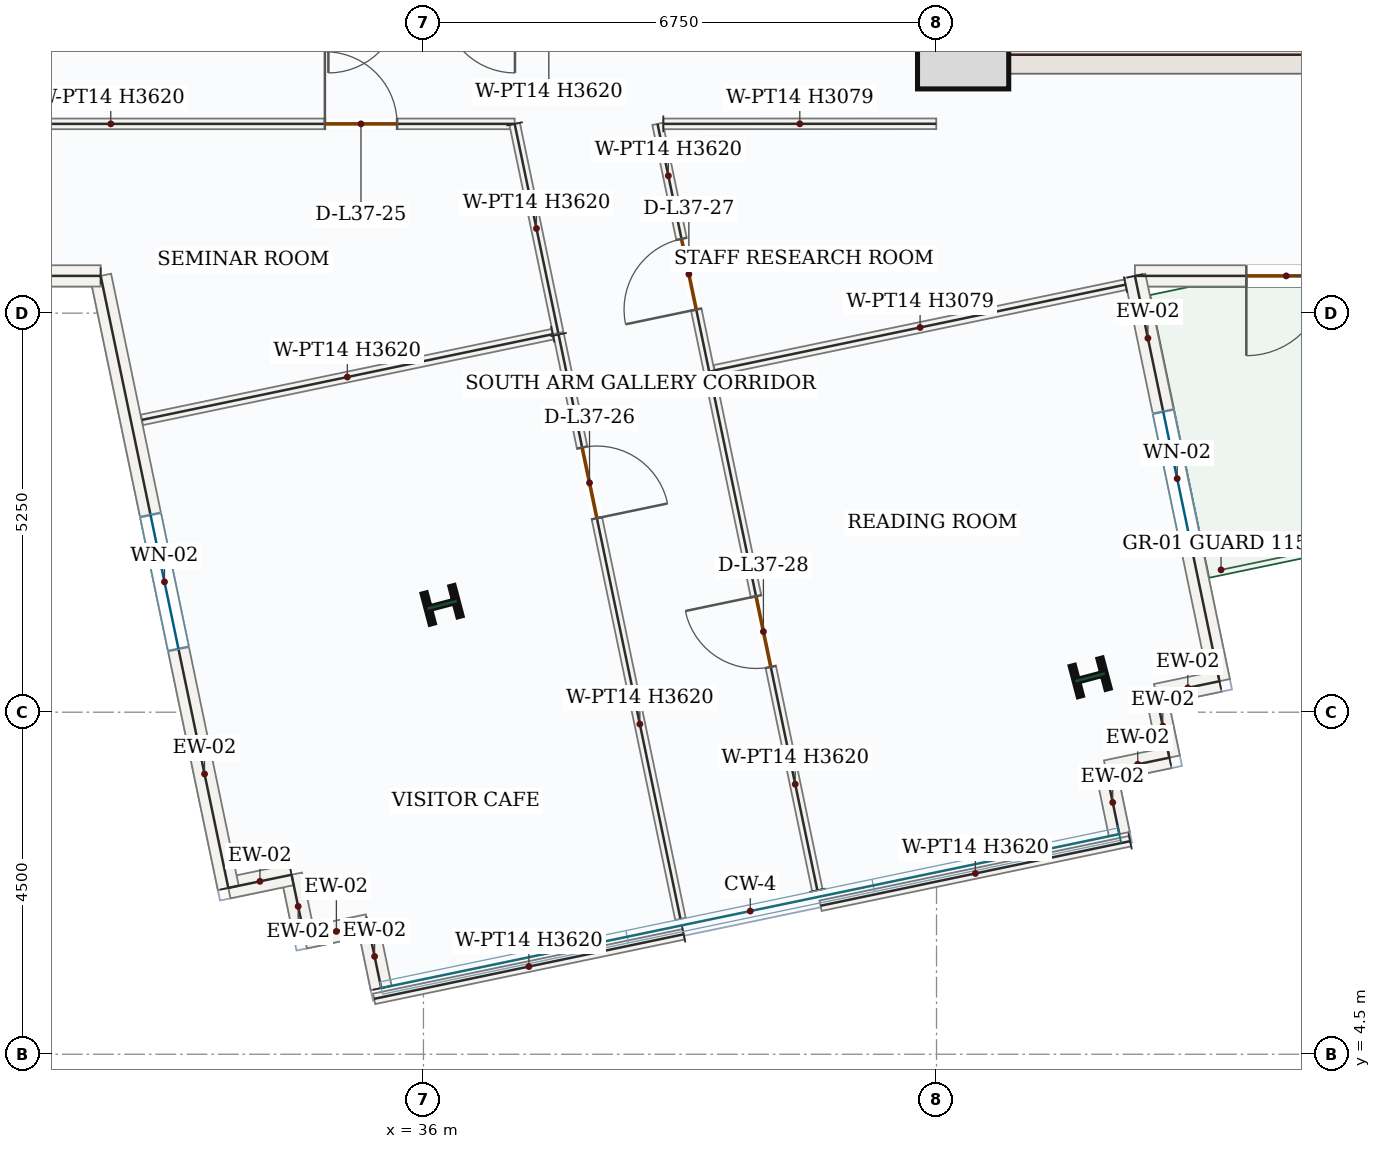
"""IFC4 building model, lengths in metres.
Left out: names, types, materials, properties, quantities, classifications, styles, units other than length and angle.
Written with IfcOpenShell. Run it as: python <this file> out.ifc"""

import sys

from ifc_helpers import new_model, si_unit, direction, frame, frame_2d, origin, origin_2d, place, context, subcontext, project, spatial, rectangle, i_section, extrude, source, transform, mapped, element, fill, save


model = new_model("IFC4")
c1 = context("Model", 3, precision=1e-05, world=origin(), true_north=direction((0.0, 1.0)))
c2 = subcontext(c1, "Body", "Model", "MODEL_VIEW")
j1 = project(units=[si_unit("LENGTHUNIT", "METRE"), si_unit("PLANEANGLEUNIT", "RADIAN")], contexts=[c1])
p1 = place(None, origin())
s1 = spatial("IfcSite", under=j1, at=p1, CompositionType="ELEMENT")
p2 = place(p1, origin())
s2 = spatial("IfcBuilding", under=s1, at=p2, CompositionType="ELEMENT")
p3 = place(p2, frame((0.0, 0.0, 162.9)))
s3 = spatial("IfcBuildingStorey", under=s2, at=p3, CompositionType="ELEMENT", Elevation=162.9)
p4 = place(p3, frame((43.0, 17.4, 0.0), z_axis=(0.0, 0.0, 1.0), x_axis=(0.0, 1.0, 0.0)))
e1 = element("IfcWall", 1, at=p4, inside=s3, PredefinedType="SHEAR", context=c2, shape_type="SweptSolid", body=[
    extrude(rectangle(XDim=8.55, YDim=0.5, at=frame_2d((4.275, 0.0))), origin(), (0.0, 0.0, 1.0), 3.62),
])
p5 = place(p4, frame((6.65, 0.0, 0.0)))
e2 = element("IfcOpeningElement", 2, at=p5, cuts=e1, PredefinedType="OPENING", context=c2, shape_type="SweptSolid", body=[
    extrude(rectangle(XDim=1.1, YDim=2.2, at=frame_2d((0.55, 1.1))), frame((0.0, 0.26, 0.0), z_axis=(0.0, -1.0, 0.0), x_axis=(1.0, 0.0, 0.0)), (0.0, 0.0, 1.0), 0.52),
])
p6 = place(p4, frame((1.75, 0.0, 0.0)))
e3 = element("IfcOpeningElement", 3, at=p6, cuts=e1, PredefinedType="OPENING", context=c2, shape_type="SweptSolid", body=[
    extrude(rectangle(XDim=1.3, YDim=2.2, at=frame_2d((0.65, 1.1))), frame((0.0, 0.26, 0.0), z_axis=(0.0, -1.0, 0.0), x_axis=(1.0, 0.0, 0.0)), (0.0, 0.0, 1.0), 0.52),
])
p7 = place(p4, frame((4.55, 0.0, 0.0)))
e4 = element("IfcOpeningElement", 4, at=p7, cuts=e1, PredefinedType="OPENING", context=c2, shape_type="SweptSolid", body=[
    extrude(rectangle(XDim=0.88, YDim=2.1, at=frame_2d((0.44, 1.05))), frame((0.0, 0.26, 0.0), z_axis=(0.0, -1.0, 0.0), x_axis=(1.0, 0.0, 0.0)), (0.0, 0.0, 1.0), 0.52),
])
m1 = source(origin(), c2, "Body", "SweptSolid", [
    extrude(rectangle(XDim=7.0, YDim=0.5, at=frame_2d((3.5, 0.0))), origin(), (0.0, 0.0, 1.0), 3.62),
])
p8 = place(p3, frame((43.25, 17.65, 0.0), z_axis=(0.0, 0.0, 1.0), x_axis=(1.0, 0.0, 0.0)))
e5 = element("IfcWall", 5, at=p8, inside=s3, PredefinedType="SHEAR", context=c2, shape_type="MappedRepresentation", body=[
    mapped(m1, transform((0.0, 0.0, 0.0), x_axis=(1.0, 0.0, 0.0), y_axis=(0.0, 1.0, 0.0), z_axis=(0.0, 0.0, 1.0), scale=1.0)),
])
m2 = source(origin(), c2, "Body", "SweptSolid", [
    extrude(rectangle(XDim=1.2, YDim=1.2, at=origin_2d()), origin(), (0.0, 0.0, 1.0), 3.9),
])
p9 = place(p3, frame((43.1, 17.8, 0.0), z_axis=(0.0, 0.0, 1.0), x_axis=(1.0, 0.0, 0.0)))
e6 = element("IfcColumn", 6, at=p9, inside=s3, PredefinedType="COLUMN", context=c2, shape_type="MappedRepresentation", body=[
    mapped(m2, transform((0.0, 0.0, 0.0), x_axis=(1.0, 0.0, 0.0), y_axis=(0.0, 1.0, 0.0), z_axis=(0.0, 0.0, 1.0), scale=1.0)),
])
m3 = source(origin(), c2, "Body", "SweptSolid", [
    extrude(i_section(OverallWidth=0.412, OverallDepth=0.435, WebThickness=0.036, FlangeThickness=0.057, FilletRadius=0.018, at=origin_2d()), origin(), (0.0, 0.0, 1.0), 3.9),
])
for number, where, z_axis, x_axis in (
    (7, (36.245, 10.412, 0.0), (0.0, 0.0, 1.0), (-0.255, 0.967, 0.0)),
    (8, (44.772, 9.459, 0.0), (0.0, 0.0, 1.0), (-0.255, 0.967, 0.0)),
):
    element("IfcColumn", number, at=place(p3, frame(where, z_axis=z_axis, x_axis=x_axis)), inside=s3, PredefinedType="COLUMN", context=c2, shape_type="MappedRepresentation", body=[
        mapped(m3, transform((0.0, 0.0, 0.0), x_axis=(1.0, 0.0, 0.0), y_axis=(0.0, 1.0, 0.0), z_axis=(0.0, 0.0, 1.0), scale=1.0)),
    ])
p10 = place(p3, frame((49.342, 14.74, 0.0), z_axis=(0.0, 0.0, 1.0), x_axis=(-1.0, 0.0, 0.0)))
e9 = element("IfcWall", 9, at=p10, inside=s3, PredefinedType="SOLIDWALL", context=c2, shape_type="SweptSolid", body=[
    extrude(rectangle(XDim=3.982, YDim=0.28, at=frame_2d((1.991, 0.0))), origin(), (0.0, 0.0, 1.0), 3.62),
])
p11 = place(p10, frame((1.466, 0.0, 0.0)))
e10 = element("IfcOpeningElement", 10, at=p11, cuts=e9, PredefinedType="OPENING", context=c2, shape_type="SweptSolid", body=[
    extrude(rectangle(XDim=1.05, YDim=2.15, at=frame_2d((0.525, 1.075))), frame((0.0, 0.15, 0.0), z_axis=(0.0, -1.0, 0.0), x_axis=(1.0, 0.0, 0.0)), (0.0, 0.0, 1.0), 0.3),
])
p12 = place(p3, frame((45.36, 14.74, 0.0), z_axis=(0.0, 0.0, 1.0), x_axis=(0.204151126022, -0.978939384101, 0.0)))
e11 = element("IfcWall", 11, at=p12, inside=s3, PredefinedType="SOLIDWALL", context=c2, shape_type="SweptSolid", body=[
    extrude(rectangle(XDim=5.447, YDim=0.28, at=frame_2d((2.724, 0.0))), origin(), (0.0, 0.0, 1.0), 3.62),
])
p13 = place(p12, frame((1.824, 0.0, 0.85)))
e12 = element("IfcOpeningElement", 12, at=p13, cuts=e11, PredefinedType="OPENING", context=c2, shape_type="SweptSolid", body=[
    extrude(rectangle(XDim=1.8, YDim=1.75, at=frame_2d((0.9, 0.875))), frame((0.0, 0.15, 0.0), z_axis=(0.0, -1.0, 0.0), x_axis=(1.0, 0.0, 0.0)), (0.0, 0.0, 1.0), 0.3),
])
m4 = source(origin(), c2, "Body", "SweptSolid", [
    extrude(rectangle(XDim=0.85, YDim=0.28, at=frame_2d((0.425, 0.0))), origin(), (0.0, 0.0, 1.0), 3.62),
])
for number, where, z_axis, x_axis in (
    (13, (46.472, 9.407, 0.0), (0.0, 0.0, 1.0), (-0.979, -0.204, 0.0)),
    (14, (45.64, 9.234, 0.0), (0.0, 0.0, 1.0), (0.204, -0.979, 0.0)),
):
    element("IfcWall", number, at=place(p3, frame(where, z_axis=z_axis, x_axis=x_axis)), inside=s3, PredefinedType="SOLIDWALL", context=c2, shape_type="MappedRepresentation", body=[
        mapped(m4, transform((0.0, 0.0, 0.0), x_axis=(1.0, 0.0, 0.0), y_axis=(0.0, 1.0, 0.0), z_axis=(0.0, 0.0, 1.0), scale=1.0)),
    ])
m5 = source(origin(), c2, "Body", "SweptSolid", [
    extrude(rectangle(XDim=0.85, YDim=0.28, at=frame_2d((0.425, 0.0))), origin(), (0.0, 0.0, 1.0), 3.62),
])
p14 = place(p3, frame((45.814, 8.402, 0.0), z_axis=(0.0, 0.0, 1.0), x_axis=(-0.97893500384, -0.204172128991, 0.0)))
e15 = element("IfcWall", 15, at=p14, inside=s3, PredefinedType="SOLIDWALL", context=c2, shape_type="MappedRepresentation", body=[
    mapped(m5, transform((0.0, 0.0, 0.0), x_axis=(1.0, 0.0, 0.0), y_axis=(0.0, 1.0, 0.0), z_axis=(0.0, 0.0, 1.0), scale=1.0)),
])
for number, where, z_axis, x_axis in (
    (16, (44.981, 8.228, 0.0), (0.0, 0.0, 1.0), (0.204, -0.979, 0.0)),
    (17, (35.444, 5.371, 0.0), (0.0, 0.0, 1.0), (-0.204, 0.979, 0.0)),
    (18, (35.271, 6.203, 0.0), (0.0, 0.0, 1.0), (-0.979, -0.204, 0.0)),
    (19, (34.438, 6.03, 0.0), (0.0, 0.0, 1.0), (-0.204, 0.979, 0.0)),
):
    element("IfcWall", number, at=place(p3, frame(where, z_axis=z_axis, x_axis=x_axis)), inside=s3, PredefinedType="SOLIDWALL", context=c2, shape_type="MappedRepresentation", body=[
        mapped(m4, transform((0.0, 0.0, 0.0), x_axis=(1.0, 0.0, 0.0), y_axis=(0.0, 1.0, 0.0), z_axis=(0.0, 0.0, 1.0), scale=1.0)),
    ])
p15 = place(p3, frame((34.265, 6.862, 0.0), z_axis=(0.0, 0.0, 1.0), x_axis=(-0.97893500384, -0.204172128991, 0.0)))
e20 = element("IfcWall", 20, at=p15, inside=s3, PredefinedType="SOLIDWALL", context=c2, shape_type="MappedRepresentation", body=[
    mapped(m5, transform((0.0, 0.0, 0.0), x_axis=(1.0, 0.0, 0.0), y_axis=(0.0, 1.0, 0.0), z_axis=(0.0, 0.0, 1.0), scale=1.0)),
])
p16 = place(p3, frame((33.433, 6.688, 0.0), z_axis=(0.0, 0.0, 1.0), x_axis=(-0.204152195211, 0.978939161128, 0.0)))
e21 = element("IfcWall", 21, at=p16, inside=s3, PredefinedType="SOLIDWALL", context=c2, shape_type="SweptSolid", body=[
    extrude(rectangle(XDim=8.225, YDim=0.28, at=frame_2d((4.113, 0.0))), origin(), (0.0, 0.0, 1.0), 3.62),
])
p17 = place(p16, frame((3.213, 0.0, 0.85)))
e22 = element("IfcOpeningElement", 22, at=p17, cuts=e21, PredefinedType="OPENING", context=c2, shape_type="SweptSolid", body=[
    extrude(rectangle(XDim=1.8, YDim=1.75, at=frame_2d((0.9, 0.875))), frame((0.0, 0.15, 0.0), z_axis=(0.0, -1.0, 0.0), x_axis=(1.0, 0.0, 0.0)), (0.0, 0.0, 1.0), 0.3),
])
p18 = place(p3, frame((31.753, 14.74, 0.0), z_axis=(0.0, 0.0, 1.0), x_axis=(-1.0, 0.0, 0.0)))
e23 = element("IfcWall", 23, at=p18, inside=s3, PredefinedType="SOLIDWALL", context=c2, shape_type="SweptSolid", body=[
    extrude(rectangle(XDim=9.095, YDim=0.28, at=frame_2d((4.548, 0.0))), origin(), (0.0, 0.0, 1.0), 3.62),
])
p19 = place(p18, frame((3.648, 0.0, 0.85)))
e24 = element("IfcOpeningElement", 24, at=p19, cuts=e23, PredefinedType="OPENING", context=c2, shape_type="SweptSolid", body=[
    extrude(rectangle(XDim=1.8, YDim=1.75, at=frame_2d((0.9, 0.875))), frame((0.0, 0.15, 0.0), z_axis=(0.0, -1.0, 0.0), x_axis=(1.0, 0.0, 0.0)), (0.0, 0.0, 1.0), 0.3),
])
p20 = place(p3, frame((29.219, 16.74, 0.0), z_axis=(0.0, 0.0, 1.0), x_axis=(1.0, 0.0, 0.0)))
e25 = element("IfcWall", 25, at=p20, inside=s3, PredefinedType="PARTITIONING", context=c2, shape_type="SweptSolid", body=[
    extrude(rectangle(XDim=7.98, YDim=0.14, at=frame_2d((3.99, 0.0))), origin(), (0.0, 0.0, 1.0), 3.62),
])
p21 = place(p20, frame((5.484, 0.0, 0.0)))
e26 = element("IfcOpeningElement", 26, at=p21, cuts=e25, PredefinedType="OPENING", context=c2, shape_type="SweptSolid", body=[
    extrude(rectangle(XDim=0.95, YDim=2.15, at=frame_2d((0.475, 1.075))), frame((0.0, 0.08, 0.0), z_axis=(0.0, -1.0, 0.0), x_axis=(1.0, 0.0, 0.0)), (0.0, 0.0, 1.0), 0.16),
])
m6 = source(origin(), c2, "Body", "SweptSolid", [
    extrude(rectangle(XDim=2.811, YDim=0.14, at=frame_2d((1.406, 0.0))), origin(), (0.0, 0.0, 1.0), 3.62),
])
p22 = place(p3, frame((37.2, 16.74, 0.0), z_axis=(0.0, 0.0, 1.0), x_axis=(0.204092977776, -0.978951508719, 0.0)))
e27 = element("IfcWall", 27, at=p22, inside=s3, PredefinedType="PARTITIONING", context=c2, shape_type="MappedRepresentation", body=[
    mapped(m6, transform((0.0, 0.0, 0.0), x_axis=(1.0, 0.0, 0.0), y_axis=(0.0, 1.0, 0.0), z_axis=(0.0, 0.0, 1.0), scale=1.0)),
])
m7 = source(origin(), c2, "Body", "SweptSolid", [
    extrude(rectangle(XDim=5.52, YDim=0.14, at=frame_2d((2.76, 0.0))), origin(), (0.0, 0.0, 1.0), 3.62),
])
p23 = place(p3, frame((37.7, 13.973, 0.0), z_axis=(0.0, 0.0, 1.0), x_axis=(-0.978929612498, -0.204197976909, 0.0)))
e28 = element("IfcWall", 28, at=p23, inside=s3, PredefinedType="PARTITIONING", context=c2, shape_type="MappedRepresentation", body=[
    mapped(m7, transform((0.0, 0.0, 0.0), x_axis=(1.0, 0.0, 0.0), y_axis=(0.0, 1.0, 0.0), z_axis=(0.0, 0.0, 1.0), scale=1.0)),
])
p24 = place(p3, frame((39.759, 13.483, 0.0), z_axis=(0.0, 0.0, 1.0), x_axis=(-0.204124193585, 0.97894500029, 0.0)))
e29 = element("IfcWall", 29, at=p24, inside=s3, PredefinedType="PARTITIONING", context=c2, shape_type="SweptSolid", body=[
    extrude(rectangle(XDim=3.327, YDim=0.14, at=frame_2d((1.664, 0.0))), origin(), (0.0, 0.0, 1.0), 3.62),
])
p25 = place(p24, frame((0.832, 0.0, 0.0)))
e30 = element("IfcOpeningElement", 30, at=p25, cuts=e29, PredefinedType="OPENING", context=c2, shape_type="SweptSolid", body=[
    extrude(rectangle(XDim=0.95, YDim=2.15, at=frame_2d((0.475, 1.075))), frame((0.0, 0.08, 0.0), z_axis=(0.0, -1.0, 0.0), x_axis=(1.0, 0.0, 0.0)), (0.0, 0.0, 1.0), 0.16),
])
m8 = source(origin(), c2, "Body", "SweptSolid", [
    extrude(rectangle(XDim=3.591, YDim=0.14, at=frame_2d((1.795, 0.0))), origin(), (0.0, 0.0, 1.0), 3.079),
])
p26 = place(p3, frame((39.156, 16.74, 0.0), z_axis=(0.0, 0.0, 1.0), x_axis=(0.999999942209, 0.000339974142, 0.0)))
e31 = element("IfcWall", 31, at=p26, inside=s3, PredefinedType="PARTITIONING", context=c2, shape_type="MappedRepresentation", body=[
    mapped(m8, transform((0.0, 0.0, 0.0), x_axis=(1.0, 0.0, 0.0), y_axis=(0.0, 1.0, 0.0), z_axis=(0.0, 0.0, 1.0), scale=1.0)),
])
m9 = source(origin(), c2, "Body", "SweptSolid", [
    extrude(rectangle(XDim=5.52, YDim=0.14, at=frame_2d((2.76, 0.0))), origin(), (0.0, 0.0, 1.0), 3.079),
])
p27 = place(p3, frame((45.236, 14.625, 0.0), z_axis=(0.0, 0.0, 1.0), x_axis=(-0.97893845252, -0.204155593062, 0.0)))
e32 = element("IfcWall", 32, at=p27, inside=s3, PredefinedType="PARTITIONING", context=c2, shape_type="MappedRepresentation", body=[
    mapped(m9, transform((0.0, 0.0, 0.0), x_axis=(1.0, 0.0, 0.0), y_axis=(0.0, 1.0, 0.0), z_axis=(0.0, 0.0, 1.0), scale=1.0)),
])
m10 = source(origin(), c2, "Body", "SweptSolid", [
    extrude(rectangle(XDim=4.16, YDim=0.14, at=frame_2d((2.08, 0.0))), origin(), (0.0, 0.0, 1.0), 3.62),
])
p28 = place(p3, frame((45.297, 7.303, 0.0), z_axis=(0.0, 0.0, 1.0), x_axis=(-0.978935967244, -0.204167509744, 0.0)))
e33 = element("IfcWall", 33, at=p28, inside=s3, PredefinedType="PARTITIONING", context=c2, shape_type="MappedRepresentation", body=[
    mapped(m10, transform((0.0, 0.0, 0.0), x_axis=(1.0, 0.0, 0.0), y_axis=(0.0, 1.0, 0.0), z_axis=(0.0, 0.0, 1.0), scale=1.0)),
])
p29 = place(p3, frame((41.182, 6.657, 0.0), z_axis=(0.0, 0.0, 1.0), x_axis=(-0.204158980406, 0.97893774609, 0.0)))
e34 = element("IfcWall", 34, at=p29, inside=s3, PredefinedType="PARTITIONING", context=c2, shape_type="SweptSolid", body=[
    extrude(rectangle(XDim=6.953, YDim=0.14, at=frame_2d((3.476, 0.0))), origin(), (0.0, 0.0, 1.0), 3.62),
])
p30 = place(p29, frame((3.001, 0.0, 0.0)))
e35 = element("IfcOpeningElement", 35, at=p30, cuts=e34, PredefinedType="OPENING", context=c2, shape_type="SweptSolid", body=[
    extrude(rectangle(XDim=0.95, YDim=2.15, at=frame_2d((0.475, 1.075))), frame((0.0, 0.08, 0.0), z_axis=(0.0, -1.0, 0.0), x_axis=(1.0, 0.0, 0.0)), (0.0, 0.0, 1.0), 0.16),
])
p31 = place(p3, frame((37.778, 13.969, 0.0), z_axis=(0.0, 0.0, 1.0), x_axis=(0.204175249208, -0.978934353065, 0.0)))
e36 = element("IfcWall", 36, at=p31, inside=s3, PredefinedType="PARTITIONING", context=c2, shape_type="SweptSolid", body=[
    extrude(rectangle(XDim=7.853, YDim=0.14, at=frame_2d((3.926, 0.0))), origin(), (0.0, 0.0, 1.0), 3.62),
])
p32 = place(p31, frame((1.519, 0.0, 0.0)))
e37 = element("IfcOpeningElement", 37, at=p32, cuts=e36, PredefinedType="OPENING", context=c2, shape_type="SweptSolid", body=[
    extrude(rectangle(XDim=0.95, YDim=2.15, at=frame_2d((0.475, 1.075))), frame((0.0, 0.08, 0.0), z_axis=(0.0, -1.0, 0.0), x_axis=(1.0, 0.0, 0.0)), (0.0, 0.0, 1.0), 0.16),
])
m11 = source(origin(), c2, "Body", "SweptSolid", [
    extrude(rectangle(XDim=4.16, YDim=0.14, at=frame_2d((2.08, 0.0))), origin(), (0.0, 0.0, 1.0), 3.62),
])
p33 = place(p3, frame((39.423, 6.078, 0.0), z_axis=(0.0, 0.0, 1.0), x_axis=(-0.978945249929, -0.204122996358, 0.0)))
e38 = element("IfcWall", 38, at=p33, inside=s3, PredefinedType="PARTITIONING", context=c2, shape_type="MappedRepresentation", body=[
    mapped(m11, transform((0.0, 0.0, 0.0), x_axis=(1.0, 0.0, 0.0), y_axis=(0.0, 1.0, 0.0), z_axis=(0.0, 0.0, 1.0), scale=1.0)),
])
m12 = source(origin(), c2, "Body", "SweptSolid", [
    extrude(rectangle(XDim=1.05, YDim=2.15, at=frame_2d((0.525, 1.075))), frame((0.0, 0.025, 0.0), z_axis=(0.0, -1.0, 0.0), x_axis=(1.0, 0.0, 0.0)), (0.0, 0.0, 1.0), 0.05),
])
p34 = place(p11, origin())
e39 = element("IfcDoor", 39, at=p34, inside=s3, OperationType="SINGLE_SWING_RIGHT", PredefinedType="DOOR", context=c2, shape_type="MappedRepresentation", body=[
    mapped(m12, transform((0.0, 0.0, 0.0), x_axis=(1.0, 0.0, 0.0), y_axis=(0.0, 1.0, 0.0), z_axis=(0.0, 0.0, 1.0), scale=1.0)),
])
fill(e10, e39)
m13 = source(origin(), c2, "Body", "SweptSolid", [
    extrude(rectangle(XDim=1.8, YDim=1.75, at=frame_2d((0.9, 0.875))), frame((0.0, 0.03, 0.0), z_axis=(0.0, -1.0, 0.0), x_axis=(1.0, 0.0, 0.0)), (0.0, 0.0, 1.0), 0.06),
])
p35 = place(p13, origin())
e40 = element("IfcWindow", 40, at=p35, inside=s3, PartitioningType="DOUBLE_PANEL_VERTICAL", PredefinedType="WINDOW", context=c2, shape_type="MappedRepresentation", body=[
    mapped(m13, transform((0.0, 0.0, 0.0), x_axis=(1.0, 0.0, 0.0), y_axis=(0.0, 1.0, 0.0), z_axis=(0.0, 0.0, 1.0), scale=1.0)),
])
fill(e12, e40)
p36 = place(p17, origin())
e41 = element("IfcWindow", 41, at=p36, inside=s3, PartitioningType="DOUBLE_PANEL_VERTICAL", PredefinedType="WINDOW", context=c2, shape_type="MappedRepresentation", body=[
    mapped(m13, transform((0.0, 0.0, 0.0), x_axis=(1.0, 0.0, 0.0), y_axis=(0.0, 1.0, 0.0), z_axis=(0.0, 0.0, 1.0), scale=1.0)),
])
fill(e22, e41)
m14 = source(origin(), c2, "Body", "SweptSolid", [
    extrude(rectangle(XDim=0.95, YDim=2.15, at=frame_2d((0.475, 1.075))), frame((0.0, 0.025, 0.0), z_axis=(0.0, -1.0, 0.0), x_axis=(1.0, 0.0, 0.0)), (0.0, 0.0, 1.0), 0.05),
])
p37 = place(p21, origin())
e42 = element("IfcDoor", 42, at=p37, inside=s3, OperationType="SINGLE_SWING_LEFT", PredefinedType="DOOR", context=c2, shape_type="MappedRepresentation", body=[
    mapped(m14, transform((0.0, 0.0, 0.0), x_axis=(1.0, 0.0, 0.0), y_axis=(0.0, 1.0, 0.0), z_axis=(0.0, 0.0, 1.0), scale=1.0)),
])
fill(e26, e42)
p38 = place(p32, origin())
e43 = element("IfcDoor", 43, at=p38, inside=s3, OperationType="SINGLE_SWING_RIGHT", PredefinedType="DOOR", context=c2, shape_type="MappedRepresentation", body=[
    mapped(m14, transform((0.0, 0.0, 0.0), x_axis=(1.0, 0.0, 0.0), y_axis=(0.0, 1.0, 0.0), z_axis=(0.0, 0.0, 1.0), scale=1.0)),
])
fill(e37, e43)
p39 = place(p25, origin())
e44 = element("IfcDoor", 44, at=p39, inside=s3, OperationType="SINGLE_SWING_LEFT", PredefinedType="DOOR", context=c2, shape_type="MappedRepresentation", body=[
    mapped(m14, transform((0.0, 0.0, 0.0), x_axis=(1.0, 0.0, 0.0), y_axis=(0.0, 1.0, 0.0), z_axis=(0.0, 0.0, 1.0), scale=1.0)),
])
fill(e30, e44)
p40 = place(p30, origin())
e45 = element("IfcDoor", 45, at=p40, inside=s3, OperationType="SINGLE_SWING_RIGHT", PredefinedType="DOOR", context=c2, shape_type="MappedRepresentation", body=[
    mapped(m14, transform((0.0, 0.0, 0.0), x_axis=(1.0, 0.0, 0.0), y_axis=(0.0, 1.0, 0.0), z_axis=(0.0, 0.0, 1.0), scale=1.0)),
])
fill(e35, e45)
save(model, sys.argv[1])
